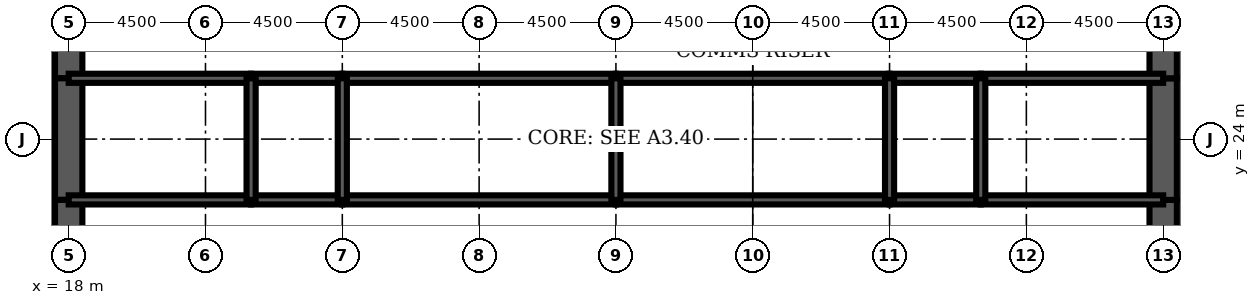
"""IFC4 building model, lengths in metres.
Left out: names, types, materials, properties, quantities, classifications, styles, units other than length and angle.
Written with IfcOpenShell. Run it as: python <this file> out.ifc"""

import sys

from ifc_helpers import new_model, si_unit, direction, frame, frame_2d, origin, place, context, subcontext, project, spatial, rectangle, extrude, element, fill, save


model = new_model("IFC4")
c1 = context("Model", 3, precision=1e-05, world=origin(), true_north=direction((0.0, 1.0)))
c2 = subcontext(c1, "Body", "Model", "MODEL_VIEW")
j1 = project(units=[si_unit("LENGTHUNIT", "METRE"), si_unit("PLANEANGLEUNIT", "RADIAN")], contexts=[c1])
p1 = place(None, origin())
s1 = spatial("IfcSite", under=j1, at=p1, CompositionType="ELEMENT")
p2 = place(p1, origin())
s2 = spatial("IfcBuilding", under=s1, at=p2, CompositionType="ELEMENT")
p3 = place(p2, frame((0.0, 0.0, 171.9)))
s3 = spatial("IfcBuildingStorey", under=s2, at=p3, CompositionType="ELEMENT", Elevation=171.9)
p4 = place(p3, frame((18.0, 28.8, 0.0), z_axis=(0.0, 0.0, 1.0), x_axis=(0.0, -1.0, 0.0)))
e1 = element("IfcWall", 1, at=p4, inside=s3, PredefinedType="SHEAR", context=c2, shape_type="SweptSolid", body=[
    extrude(rectangle(XDim=2.8, YDim=0.9, at=frame_2d((1.4, 0.0))), origin(), (0.0, 0.0, 1.0), 4.2),
])
p5 = place(p4, frame((0.4, 0.0, 0.0)))
e2 = element("IfcOpeningElement", 2, at=p5, cuts=e1, PredefinedType="OPENING", context=c2, shape_type="SweptSolid", body=[
    extrude(rectangle(XDim=1.8, YDim=2.1, at=frame_2d((0.9, 1.05))), frame((0.0, 0.46, 0.0), z_axis=(0.0, -1.0, 0.0), x_axis=(1.0, 0.0, 0.0)), (0.0, 0.0, 1.0), 0.92),
])
p6 = place(p3, frame((18.0, 26.0, 0.0), z_axis=(0.0, 0.0, 1.0), x_axis=(0.0, -1.0, 0.0)))
e3 = element("IfcWall", 3, at=p6, inside=s3, PredefinedType="SHEAR", context=c2, shape_type="SweptSolid", body=[
    extrude(rectangle(XDim=4.0, YDim=0.9, at=frame_2d((2.0, 0.0))), origin(), (0.0, 0.0, 1.0), 4.2),
])
p7 = place(p3, frame((18.0, 22.0, 0.0), z_axis=(0.0, 0.0, 1.0), x_axis=(0.0, -1.0, 0.0)))
e4 = element("IfcWall", 4, at=p7, inside=s3, PredefinedType="SHEAR", context=c2, shape_type="SweptSolid", body=[
    extrude(rectangle(XDim=2.8, YDim=0.9, at=frame_2d((1.4, 0.0))), origin(), (0.0, 0.0, 1.0), 4.2),
])
p8 = place(p7, frame((0.6, 0.0, 0.0)))
e5 = element("IfcOpeningElement", 5, at=p8, cuts=e4, PredefinedType="OPENING", context=c2, shape_type="SweptSolid", body=[
    extrude(rectangle(XDim=1.8, YDim=2.1, at=frame_2d((0.9, 1.05))), frame((0.0, 0.46, 0.0), z_axis=(0.0, -1.0, 0.0), x_axis=(1.0, 0.0, 0.0)), (0.0, 0.0, 1.0), 0.92),
])
p9 = place(p3, frame((54.0, 19.2, 0.0), z_axis=(0.0, 0.0, 1.0), x_axis=(0.0, 1.0, 0.0)))
e6 = element("IfcWall", 6, at=p9, inside=s3, PredefinedType="SHEAR", context=c2, shape_type="SweptSolid", body=[
    extrude(rectangle(XDim=2.8, YDim=0.9, at=frame_2d((1.4, 0.0))), origin(), (0.0, 0.0, 1.0), 4.2),
])
p10 = place(p9, frame((0.4, 0.0, 0.0)))
e7 = element("IfcOpeningElement", 7, at=p10, cuts=e6, PredefinedType="OPENING", context=c2, shape_type="SweptSolid", body=[
    extrude(rectangle(XDim=1.8, YDim=2.1, at=frame_2d((0.9, 1.05))), frame((0.0, 0.46, 0.0), z_axis=(0.0, -1.0, 0.0), x_axis=(1.0, 0.0, 0.0)), (0.0, 0.0, 1.0), 0.92),
])
p11 = place(p3, frame((54.0, 22.0, 0.0), z_axis=(0.0, 0.0, 1.0), x_axis=(0.0, 1.0, 0.0)))
e8 = element("IfcWall", 8, at=p11, inside=s3, PredefinedType="SHEAR", context=c2, shape_type="SweptSolid", body=[
    extrude(rectangle(XDim=4.0, YDim=0.9, at=frame_2d((2.0, 0.0))), origin(), (0.0, 0.0, 1.0), 4.2),
])
p12 = place(p3, frame((54.0, 26.0, 0.0), z_axis=(0.0, 0.0, 1.0), x_axis=(0.0, 1.0, 0.0)))
e9 = element("IfcWall", 9, at=p12, inside=s3, PredefinedType="SHEAR", context=c2, shape_type="SweptSolid", body=[
    extrude(rectangle(XDim=2.8, YDim=0.9, at=frame_2d((1.4, 0.0))), origin(), (0.0, 0.0, 1.0), 4.2),
])
p13 = place(p12, frame((0.6, 0.0, 0.0)))
e10 = element("IfcOpeningElement", 10, at=p13, cuts=e9, PredefinedType="OPENING", context=c2, shape_type="SweptSolid", body=[
    extrude(rectangle(XDim=1.8, YDim=2.1, at=frame_2d((0.9, 1.05))), frame((0.0, 0.46, 0.0), z_axis=(0.0, -1.0, 0.0), x_axis=(1.0, 0.0, 0.0)), (0.0, 0.0, 1.0), 0.92),
])
p14 = place(p3, frame((18.0, 22.0, 0.0), z_axis=(0.0, 0.0, 1.0), x_axis=(1.0, 0.0, 0.0)))
e11 = element("IfcWall", 11, at=p14, inside=s3, PredefinedType="SOLIDWALL", context=c2, shape_type="SweptSolid", body=[
    extrude(rectangle(XDim=6.0, YDim=0.3, at=frame_2d((3.0, 0.0))), origin(), (0.0, 0.0, 1.0), 4.2),
])
p15 = place(p14, frame((4.4, 0.0, 0.0)))
e12 = element("IfcOpeningElement", 12, at=p15, cuts=e11, PredefinedType="OPENING", context=c2, shape_type="SweptSolid", body=[
    extrude(rectangle(XDim=1.0, YDim=2.1, at=frame_2d((0.5, 1.05))), frame((0.0, 0.16, 0.0), z_axis=(0.0, -1.0, 0.0), x_axis=(1.0, 0.0, 0.0)), (0.0, 0.0, 1.0), 0.32),
])
p16 = place(p14, frame((0.7, 0.0, 0.0)))
e13 = element("IfcOpeningElement", 13, at=p16, cuts=e11, PredefinedType="OPENING", context=c2, shape_type="SweptSolid", body=[
    extrude(rectangle(XDim=1.0, YDim=2.1, at=frame_2d((0.5, 1.05))), frame((0.0, 0.16, 0.0), z_axis=(0.0, -1.0, 0.0), x_axis=(1.0, 0.0, 0.0)), (0.0, 0.0, 1.0), 0.32),
])
p17 = place(p3, frame((24.0, 22.0, 0.0), z_axis=(0.0, 0.0, 1.0), x_axis=(1.0, 0.0, 0.0)))
e14 = element("IfcWall", 14, at=p17, inside=s3, PredefinedType="SOLIDWALL", context=c2, shape_type="SweptSolid", body=[
    extrude(rectangle(XDim=3.0, YDim=0.3, at=frame_2d((1.5, 0.0))), origin(), (0.0, 0.0, 1.0), 4.2),
])
p18 = place(p17, frame((1.0, 0.0, 0.0)))
e15 = element("IfcOpeningElement", 15, at=p18, cuts=e14, PredefinedType="OPENING", context=c2, shape_type="SweptSolid", body=[
    extrude(rectangle(XDim=1.0, YDim=2.1, at=frame_2d((0.5, 1.05))), frame((0.0, 0.16, 0.0), z_axis=(0.0, -1.0, 0.0), x_axis=(1.0, 0.0, 0.0)), (0.0, 0.0, 1.0), 0.32),
])
p19 = place(p3, frame((27.0, 22.0, 0.0), z_axis=(0.0, 0.0, 1.0), x_axis=(1.0, 0.0, 0.0)))
e16 = element("IfcWall", 16, at=p19, inside=s3, PredefinedType="SOLIDWALL", context=c2, shape_type="SweptSolid", body=[
    extrude(rectangle(XDim=9.0, YDim=0.3, at=frame_2d((4.5, 0.0))), origin(), (0.0, 0.0, 1.0), 4.2),
])
p20 = place(p19, frame((4.0, 0.0, 0.0)))
e17 = element("IfcOpeningElement", 17, at=p20, cuts=e16, PredefinedType="OPENING", context=c2, shape_type="SweptSolid", body=[
    extrude(rectangle(XDim=1.0, YDim=2.1, at=frame_2d((0.5, 1.05))), frame((0.0, 0.16, 0.0), z_axis=(0.0, -1.0, 0.0), x_axis=(1.0, 0.0, 0.0)), (0.0, 0.0, 1.0), 0.32),
])
p21 = place(p3, frame((36.0, 22.0, 0.0), z_axis=(0.0, 0.0, 1.0), x_axis=(1.0, 0.0, 0.0)))
e18 = element("IfcWall", 18, at=p21, inside=s3, PredefinedType="SOLIDWALL", context=c2, shape_type="SweptSolid", body=[
    extrude(rectangle(XDim=9.0, YDim=0.3, at=frame_2d((4.5, 0.0))), origin(), (0.0, 0.0, 1.0), 4.2),
])
p22 = place(p21, frame((4.0, 0.0, 0.0)))
e19 = element("IfcOpeningElement", 19, at=p22, cuts=e18, PredefinedType="OPENING", context=c2, shape_type="SweptSolid", body=[
    extrude(rectangle(XDim=1.0, YDim=2.1, at=frame_2d((0.5, 1.05))), frame((0.0, 0.16, 0.0), z_axis=(0.0, -1.0, 0.0), x_axis=(1.0, 0.0, 0.0)), (0.0, 0.0, 1.0), 0.32),
])
p23 = place(p3, frame((45.0, 22.0, 0.0), z_axis=(0.0, 0.0, 1.0), x_axis=(1.0, 0.0, 0.0)))
e20 = element("IfcWall", 20, at=p23, inside=s3, PredefinedType="SOLIDWALL", context=c2, shape_type="SweptSolid", body=[
    extrude(rectangle(XDim=3.0, YDim=0.3, at=frame_2d((1.5, 0.0))), origin(), (0.0, 0.0, 1.0), 4.2),
])
p24 = place(p23, frame((1.0, 0.0, 0.0)))
e21 = element("IfcOpeningElement", 21, at=p24, cuts=e20, PredefinedType="OPENING", context=c2, shape_type="SweptSolid", body=[
    extrude(rectangle(XDim=1.0, YDim=2.1, at=frame_2d((0.5, 1.05))), frame((0.0, 0.16, 0.0), z_axis=(0.0, -1.0, 0.0), x_axis=(1.0, 0.0, 0.0)), (0.0, 0.0, 1.0), 0.32),
])
p25 = place(p3, frame((48.0, 22.0, 0.0), z_axis=(0.0, 0.0, 1.0), x_axis=(1.0, 0.0, 0.0)))
e22 = element("IfcWall", 22, at=p25, inside=s3, PredefinedType="SOLIDWALL", context=c2, shape_type="SweptSolid", body=[
    extrude(rectangle(XDim=6.0, YDim=0.3, at=frame_2d((3.0, 0.0))), origin(), (0.0, 0.0, 1.0), 4.2),
])
p26 = place(p25, frame((2.0, 0.0, 0.0)))
e23 = element("IfcOpeningElement", 23, at=p26, cuts=e22, PredefinedType="OPENING", context=c2, shape_type="SweptSolid", body=[
    extrude(rectangle(XDim=1.0, YDim=2.1, at=frame_2d((0.5, 1.05))), frame((0.0, 0.16, 0.0), z_axis=(0.0, -1.0, 0.0), x_axis=(1.0, 0.0, 0.0)), (0.0, 0.0, 1.0), 0.32),
])
p27 = place(p25, frame((4.15, 0.0, 0.0)))
e24 = element("IfcOpeningElement", 24, at=p27, cuts=e22, PredefinedType="OPENING", context=c2, shape_type="SweptSolid", body=[
    extrude(rectangle(XDim=1.0, YDim=2.1, at=frame_2d((0.5, 1.05))), frame((0.0, 0.16, 0.0), z_axis=(0.0, -1.0, 0.0), x_axis=(1.0, 0.0, 0.0)), (0.0, 0.0, 1.0), 0.32),
])
p28 = place(p3, frame((18.0, 26.0, 0.0), z_axis=(0.0, 0.0, 1.0), x_axis=(1.0, 0.0, 0.0)))
e25 = element("IfcWall", 25, at=p28, inside=s3, PredefinedType="SOLIDWALL", context=c2, shape_type="SweptSolid", body=[
    extrude(rectangle(XDim=6.0, YDim=0.3, at=frame_2d((3.0, 0.0))), origin(), (0.0, 0.0, 1.0), 4.2),
])
p29 = place(p3, frame((24.0, 26.0, 0.0), z_axis=(0.0, 0.0, 1.0), x_axis=(1.0, 0.0, 0.0)))
e26 = element("IfcWall", 26, at=p29, inside=s3, PredefinedType="SOLIDWALL", context=c2, shape_type="SweptSolid", body=[
    extrude(rectangle(XDim=3.0, YDim=0.3, at=frame_2d((1.5, 0.0))), origin(), (0.0, 0.0, 1.0), 4.2),
])
for number, where, z_axis, x_axis in (
    (27, (27.0, 26.0, 0.0), (0.0, 0.0, 1.0), (1.0, 0.0, 0.0)),
    (28, (36.0, 26.0, 0.0), (0.0, 0.0, 1.0), (1.0, 0.0, 0.0)),
):
    element("IfcWall", number, at=place(p3, frame(where, z_axis=z_axis, x_axis=x_axis)), inside=s3, PredefinedType="SOLIDWALL", context=c2, shape_type="SweptSolid", body=[
        extrude(rectangle(XDim=9.0, YDim=0.3, at=frame_2d((4.5, 0.0))), origin(), (0.0, 0.0, 1.0), 4.2),
    ])
p30 = place(p3, frame((45.0, 26.0, 0.0), z_axis=(0.0, 0.0, 1.0), x_axis=(1.0, 0.0, 0.0)))
e29 = element("IfcWall", 29, at=p30, inside=s3, PredefinedType="SOLIDWALL", context=c2, shape_type="SweptSolid", body=[
    extrude(rectangle(XDim=3.0, YDim=0.3, at=frame_2d((1.5, 0.0))), origin(), (0.0, 0.0, 1.0), 4.2),
])
p31 = place(p3, frame((48.0, 26.0, 0.0), z_axis=(0.0, 0.0, 1.0), x_axis=(1.0, 0.0, 0.0)))
e30 = element("IfcWall", 30, at=p31, inside=s3, PredefinedType="SOLIDWALL", context=c2, shape_type="SweptSolid", body=[
    extrude(rectangle(XDim=6.0, YDim=0.3, at=frame_2d((3.0, 0.0))), origin(), (0.0, 0.0, 1.0), 4.2),
])
for number, where, z_axis, x_axis in (
    (31, (24.0, 22.0, 0.0), (0.0, 0.0, 1.0), (0.0, 1.0, 0.0)),
    (32, (27.0, 22.0, 0.0), (0.0, 0.0, 1.0), (0.0, 1.0, 0.0)),
    (33, (36.0, 22.0, 0.0), (0.0, 0.0, 1.0), (0.0, 1.0, 0.0)),
    (34, (45.0, 22.0, 0.0), (0.0, 0.0, 1.0), (0.0, 1.0, 0.0)),
    (35, (48.0, 22.0, 0.0), (0.0, 0.0, 1.0), (0.0, 1.0, 0.0)),
):
    element("IfcWall", number, at=place(p3, frame(where, z_axis=z_axis, x_axis=x_axis)), inside=s3, PredefinedType="SOLIDWALL", context=c2, shape_type="SweptSolid", body=[
        extrude(rectangle(XDim=4.0, YDim=0.3, at=frame_2d((2.0, 0.0))), origin(), (0.0, 0.0, 1.0), 4.2),
    ])
p32 = place(p3, frame((42.0, 22.15, 0.0), z_axis=(0.0, 0.0, 1.0), x_axis=(0.0, 1.0, 0.0)))
e36 = element("IfcWall", 36, at=p32, inside=s3, PredefinedType="PARTITIONING", context=c2, shape_type="SweptSolid", body=[
    extrude(rectangle(XDim=3.7, YDim=0.15, at=frame_2d((1.85, 0.0))), origin(), (0.0, 0.0, 1.0), 3.0),
])
p33 = place(p32, frame((2.2, 0.0, 0.0)))
e37 = element("IfcOpeningElement", 37, at=p33, cuts=e36, PredefinedType="OPENING", context=c2, shape_type="SweptSolid", body=[
    extrude(rectangle(XDim=1.0, YDim=2.1, at=frame_2d((0.5, 1.05))), frame((0.0, 0.085, 0.0), z_axis=(0.0, -1.0, 0.0), x_axis=(1.0, 0.0, 0.0)), (0.0, 0.0, 1.0), 0.17),
])
for number, where, z_axis, x_axis in (
    (38, (20.025, 22.15, 0.0), (0.0, 0.0, 1.0), (0.0, 1.0, 0.0)),
    (39, (51.675, 22.15, 0.0), (0.0, 0.0, 1.0), (0.0, 1.0, 0.0)),
):
    element("IfcWall", number, at=place(p3, frame(where, z_axis=z_axis, x_axis=x_axis)), inside=s3, PredefinedType="PARTITIONING", context=c2, shape_type="SweptSolid", body=[
        extrude(rectangle(XDim=3.7, YDim=0.15, at=frame_2d((1.85, 0.0))), origin(), (0.0, 0.0, 1.0), 3.0),
    ])
p34 = place(p33, origin())
e40 = element("IfcDoor", 40, at=p34, inside=s3, OperationType="SINGLE_SWING_RIGHT", PredefinedType="DOOR", context=c2, shape_type="SweptSolid", body=[
    extrude(rectangle(XDim=1.0, YDim=2.1, at=frame_2d((0.5, 1.05))), frame((0.0, 0.025, 0.0), z_axis=(0.0, -1.0, 0.0), x_axis=(1.0, 0.0, 0.0)), (0.0, 0.0, 1.0), 0.05),
])
fill(e37, e40)
p35 = place(p8, origin())
e41 = element("IfcDoor", 41, at=p35, inside=s3, OperationType="SINGLE_SWING_LEFT", PredefinedType="DOOR", context=c2, shape_type="SweptSolid", body=[
    extrude(rectangle(XDim=1.8, YDim=2.1, at=frame_2d((0.9, 1.05))), frame((0.0, 0.45, 0.0), z_axis=(0.0, -1.0, 0.0), x_axis=(1.0, 0.0, 0.0)), (0.0, 0.0, 1.0), 0.899),
])
fill(e5, e41)
p36 = place(p5, origin())
e42 = element("IfcDoor", 42, at=p36, inside=s3, OperationType="SINGLE_SWING_LEFT", PredefinedType="DOOR", context=c2, shape_type="SweptSolid", body=[
    extrude(rectangle(XDim=1.8, YDim=2.1, at=frame_2d((0.9, 1.05))), frame((0.0, 0.45, 0.0), z_axis=(0.0, -1.0, 0.0), x_axis=(1.0, 0.0, 0.0)), (0.0, 0.0, 1.0), 0.899),
])
fill(e2, e42)
p37 = place(p10, origin())
e43 = element("IfcDoor", 43, at=p37, inside=s3, OperationType="SINGLE_SWING_LEFT", PredefinedType="DOOR", context=c2, shape_type="SweptSolid", body=[
    extrude(rectangle(XDim=1.8, YDim=2.1, at=frame_2d((0.9, 1.05))), frame((0.0, 0.45, 0.0), z_axis=(0.0, -1.0, 0.0), x_axis=(1.0, 0.0, 0.0)), (0.0, 0.0, 1.0), 0.899),
])
fill(e7, e43)
p38 = place(p13, origin())
e44 = element("IfcDoor", 44, at=p38, inside=s3, OperationType="SINGLE_SWING_LEFT", PredefinedType="DOOR", context=c2, shape_type="SweptSolid", body=[
    extrude(rectangle(XDim=1.8, YDim=2.1, at=frame_2d((0.9, 1.05))), frame((0.0, 0.45, 0.0), z_axis=(0.0, -1.0, 0.0), x_axis=(1.0, 0.0, 0.0)), (0.0, 0.0, 1.0), 0.899),
])
fill(e10, e44)
p39 = place(p15, origin())
e45 = element("IfcDoor", 45, at=p39, inside=s3, OperationType="SINGLE_SWING_RIGHT", PredefinedType="DOOR", context=c2, shape_type="SweptSolid", body=[
    extrude(rectangle(XDim=1.0, YDim=2.1, at=frame_2d((0.5, 1.05))), frame((0.0, 0.025, 0.0), z_axis=(0.0, -1.0, 0.0), x_axis=(1.0, 0.0, 0.0)), (0.0, 0.0, 1.0), 0.05),
])
fill(e12, e45)
p40 = place(p18, origin())
e46 = element("IfcDoor", 46, at=p40, inside=s3, OperationType="SINGLE_SWING_LEFT", PredefinedType="DOOR", context=c2, shape_type="SweptSolid", body=[
    extrude(rectangle(XDim=1.0, YDim=2.1, at=frame_2d((0.5, 1.05))), frame((0.0, 0.025, 0.0), z_axis=(0.0, -1.0, 0.0), x_axis=(1.0, 0.0, 0.0)), (0.0, 0.0, 1.0), 0.05),
])
fill(e15, e46)
p41 = place(p20, origin())
e47 = element("IfcDoor", 47, at=p41, inside=s3, OperationType="SINGLE_SWING_LEFT", PredefinedType="DOOR", context=c2, shape_type="SweptSolid", body=[
    extrude(rectangle(XDim=1.0, YDim=2.1, at=frame_2d((0.5, 1.05))), frame((0.0, 0.025, 0.0), z_axis=(0.0, -1.0, 0.0), x_axis=(1.0, 0.0, 0.0)), (0.0, 0.0, 1.0), 0.05),
])
fill(e17, e47)
p42 = place(p22, origin())
e48 = element("IfcDoor", 48, at=p42, inside=s3, OperationType="SINGLE_SWING_LEFT", PredefinedType="DOOR", context=c2, shape_type="SweptSolid", body=[
    extrude(rectangle(XDim=1.0, YDim=2.1, at=frame_2d((0.5, 1.05))), frame((0.0, 0.025, 0.0), z_axis=(0.0, -1.0, 0.0), x_axis=(1.0, 0.0, 0.0)), (0.0, 0.0, 1.0), 0.05),
])
fill(e19, e48)
p43 = place(p24, origin())
e49 = element("IfcDoor", 49, at=p43, inside=s3, OperationType="SINGLE_SWING_LEFT", PredefinedType="DOOR", context=c2, shape_type="SweptSolid", body=[
    extrude(rectangle(XDim=1.0, YDim=2.1, at=frame_2d((0.5, 1.05))), frame((0.0, 0.025, 0.0), z_axis=(0.0, -1.0, 0.0), x_axis=(1.0, 0.0, 0.0)), (0.0, 0.0, 1.0), 0.05),
])
fill(e21, e49)
p44 = place(p26, origin())
e50 = element("IfcDoor", 50, at=p44, inside=s3, OperationType="SINGLE_SWING_LEFT", PredefinedType="DOOR", context=c2, shape_type="SweptSolid", body=[
    extrude(rectangle(XDim=1.0, YDim=2.1, at=frame_2d((0.5, 1.05))), frame((0.0, 0.025, 0.0), z_axis=(0.0, -1.0, 0.0), x_axis=(1.0, 0.0, 0.0)), (0.0, 0.0, 1.0), 0.05),
])
fill(e23, e50)
p45 = place(p16, origin())
e51 = element("IfcDoor", 51, at=p45, inside=s3, OperationType="SINGLE_SWING_LEFT", PredefinedType="DOOR", context=c2, shape_type="SweptSolid", body=[
    extrude(rectangle(XDim=1.0, YDim=2.1, at=frame_2d((0.5, 1.05))), frame((0.0, 0.025, 0.0), z_axis=(0.0, -1.0, 0.0), x_axis=(1.0, 0.0, 0.0)), (0.0, 0.0, 1.0), 0.05),
])
fill(e13, e51)
p46 = place(p27, origin())
e52 = element("IfcDoor", 52, at=p46, inside=s3, OperationType="SINGLE_SWING_RIGHT", PredefinedType="DOOR", context=c2, shape_type="SweptSolid", body=[
    extrude(rectangle(XDim=1.0, YDim=2.1, at=frame_2d((0.5, 1.05))), frame((0.0, 0.025, 0.0), z_axis=(0.0, -1.0, 0.0), x_axis=(1.0, 0.0, 0.0)), (0.0, 0.0, 1.0), 0.05),
])
fill(e24, e52)
save(model, sys.argv[1])
